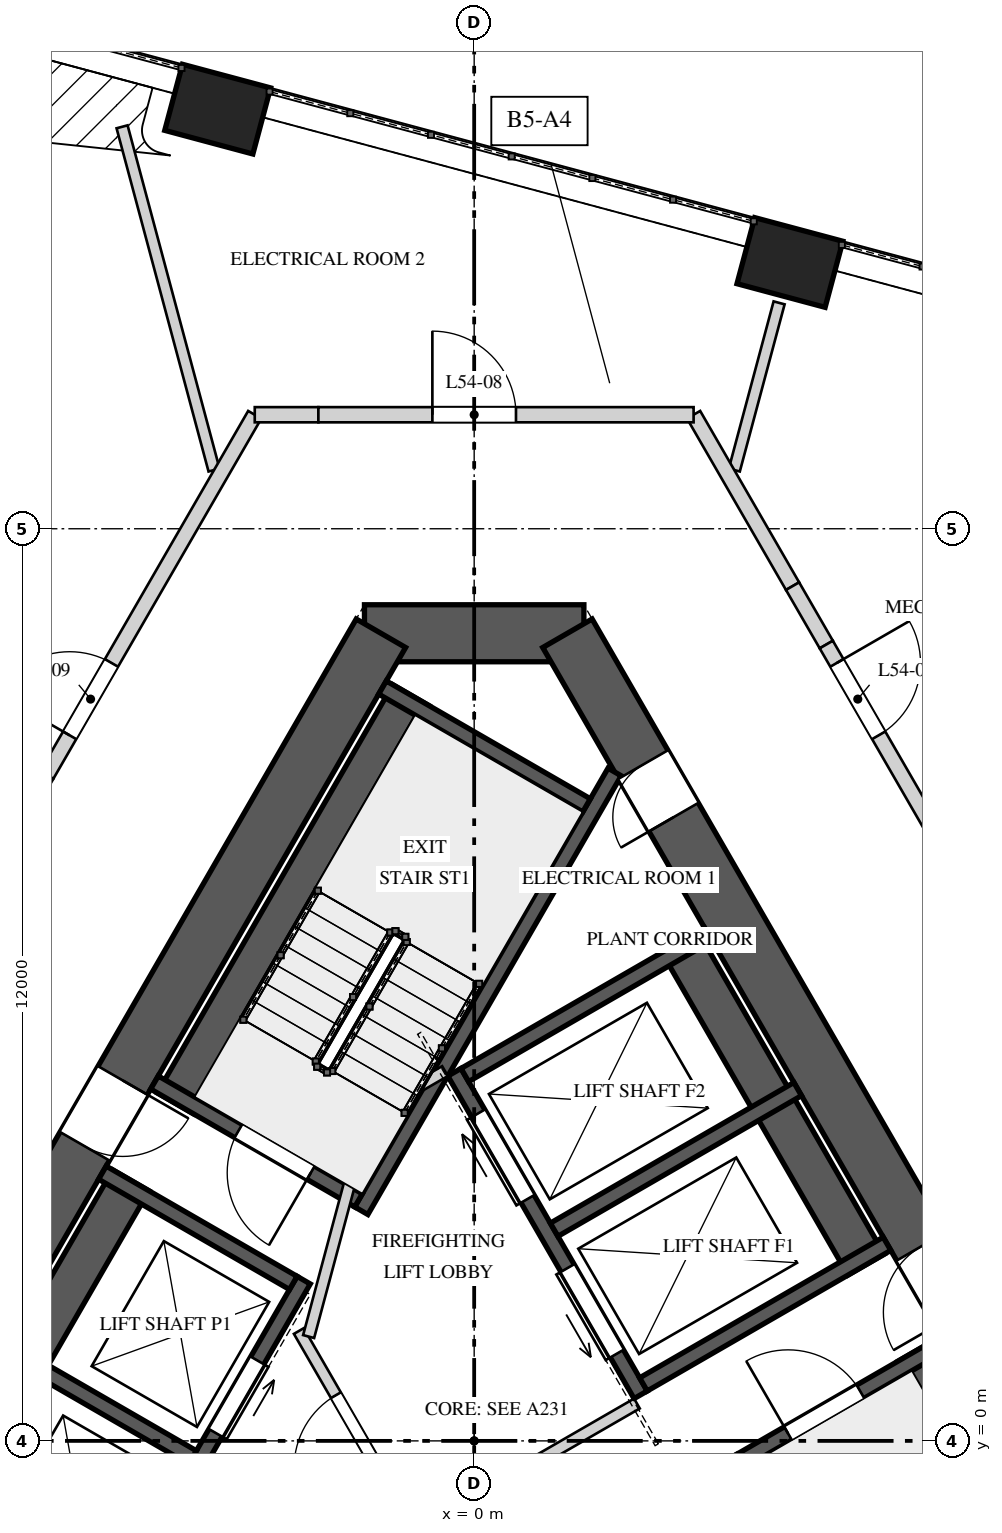
"""IFC4 building model, lengths in metres.
Left out: names, types, materials, properties, quantities, classifications, styles, units other than length and angle.
Written with IfcOpenShell. Run it as: python <this file> out.ifc"""

import sys

from ifc_helpers import new_model, si_unit, direction, frame, frame_2d, origin, origin_2d, place, context, subcontext, project, spatial, rectangle, extrude, element, fill, save


model = new_model("IFC4")
c1 = context("Model", 3, precision=1e-05, world=origin(), true_north=direction((0.0, 1.0)))
c2 = subcontext(c1, "Body", "Model", "MODEL_VIEW")
j1 = project(units=[si_unit("LENGTHUNIT", "METRE"), si_unit("PLANEANGLEUNIT", "RADIAN")], contexts=[c1])
p1 = place(None, origin())
s1 = spatial("IfcSite", under=j1, at=p1, CompositionType="ELEMENT")
p2 = place(p1, origin())
s2 = spatial("IfcBuilding", under=s1, at=p2, CompositionType="ELEMENT")
p3 = place(p2, frame((0.0, 0.0, 232.0)))
s3 = spatial("IfcBuildingStorey", under=s2, at=p3, CompositionType="ELEMENT", Elevation=232.0)
p4 = place(p3, frame((1.443, 10.625, 0.0), z_axis=(0.0, 0.0, 1.0), x_axis=(-1.0, 0.0, 0.0)))
e1 = element("IfcWall", 1, at=p4, inside=s3, PredefinedType="SHEAR", context=c2, shape_type="SweptSolid", body=[
    extrude(rectangle(XDim=2.887, YDim=0.75, at=frame_2d((1.443, 0.0))), origin(), (0.0, 0.0, 1.0), 5.2),
])
p5 = place(p3, frame((-1.227, 10.625, 0.0), z_axis=(0.0, 0.0, 1.0), x_axis=(-0.500002161919, -0.866024155596, 0.0)))
e2 = element("IfcWall", 2, at=p5, inside=s3, PredefinedType="SHEAR", context=c2, shape_type="SweptSolid", body=[
    extrude(rectangle(XDim=17.176, YDim=0.75, at=frame_2d((8.588, 0.0))), origin(), (0.0, 0.0, 1.0), 5.2),
])
p6 = place(p5, frame((6.793, 0.0, 0.0)))
e3 = element("IfcOpeningElement", 3, at=p6, cuts=e2, PredefinedType="OPENING", context=c2, shape_type="SweptSolid", body=[
    extrude(rectangle(XDim=1.0, YDim=2.4, at=frame_2d((0.5, 1.2))), frame((0.0, 0.385, 0.0), z_axis=(0.0, -1.0, 0.0), x_axis=(1.0, 0.0, 0.0)), (0.0, 0.0, 1.0), 0.77),
])
p7 = place(p3, frame((9.815, -4.25, 0.0), z_axis=(0.0, 0.0, 1.0), x_axis=(-0.500002161919, 0.866024155596, 0.0)))
e4 = element("IfcWall", 4, at=p7, inside=s3, PredefinedType="SHEAR", context=c2, shape_type="SweptSolid", body=[
    extrude(rectangle(XDim=17.176, YDim=0.75, at=frame_2d((8.588, 0.0))), origin(), (0.0, 0.0, 1.0), 5.2),
])
p8 = place(p7, frame((6.863, 0.0, 0.0)))
e5 = element("IfcOpeningElement", 5, at=p8, cuts=e4, PredefinedType="OPENING", context=c2, shape_type="SweptSolid", body=[
    extrude(rectangle(XDim=1.0, YDim=2.4, at=frame_2d((0.5, 1.2))), frame((0.0, 0.385, 0.0), z_axis=(0.0, -1.0, 0.0), x_axis=(1.0, 0.0, 0.0)), (0.0, 0.0, 1.0), 0.77),
])
p9 = place(p7, frame((14.382, 0.0, 0.0)))
e6 = element("IfcOpeningElement", 6, at=p9, cuts=e4, PredefinedType="OPENING", context=c2, shape_type="SweptSolid", body=[
    extrude(rectangle(XDim=0.8, YDim=2.1, at=frame_2d((0.4, 1.05))), frame((0.0, 0.385, 0.0), z_axis=(0.0, -1.0, 0.0), x_axis=(1.0, 0.0, 0.0)), (0.0, 0.0, 1.0), 0.77),
])
for number, where, z_axis, x_axis in (
    (7, (4.154, 15.503, 0.0), (0.0, 0.0, 1.0), (-0.966, 0.259, 0.0)),
    (8, (-3.375, 17.521, 0.0), (0.0, 0.0, 1.0), (-0.966, 0.259, 0.0)),
):
    element("IfcColumn", number, at=place(p3, frame(where, z_axis=z_axis, x_axis=x_axis)), inside=s3, PredefinedType="COLUMN", context=c2, shape_type="SweptSolid", body=[
        extrude(rectangle(XDim=1.2, YDim=0.9, at=origin_2d()), origin(), (0.0, 0.0, 1.0), 2.806),
    ])
p10 = place(p3, frame((-0.831, 9.81, 0.0), z_axis=(0.0, 0.0, 1.0), x_axis=(-0.500009909098, -0.866019682689, 0.0)))
e9 = element("IfcWall", 9, at=p10, inside=s3, PredefinedType="SOLIDWALL", context=c2, shape_type="SweptSolid", body=[
    extrude(rectangle(XDim=6.2, YDim=0.55, at=frame_2d((3.1, 0.0))), origin(), (0.0, 0.0, 1.0), 4.85),
])
p11 = place(p3, frame((1.847, 8.8, 0.0), z_axis=(0.0, 0.0, 1.0), x_axis=(-0.499980354584, -0.866036745774, 0.0)))
e10 = element("IfcWall", 10, at=p11, inside=s3, PredefinedType="SOLIDWALL", context=c2, shape_type="SweptSolid", body=[
    extrude(rectangle(XDim=6.665, YDim=0.2, at=frame_2d((3.333, 0.0))), origin(), (0.0, 0.0, 1.0), 4.85),
])
p12 = place(p3, frame((1.479, 8.361, 0.0), z_axis=(0.0, 0.0, 1.0), x_axis=(-0.86600983753, 0.500026960575, 0.0)))
e11 = element("IfcWall", 11, at=p12, inside=s3, PredefinedType="SOLIDWALL", context=c2, shape_type="SweptSolid", body=[
    extrude(rectangle(XDim=3.1, YDim=0.2, at=frame_2d((1.55, 0.0))), origin(), (0.0, 0.0, 1.0), 4.85),
])
p13 = place(p3, frame((-1.521, 3.165, 0.0), z_axis=(0.0, 0.0, 1.0), x_axis=(-0.86600983753, 0.500026960575, 0.0)))
e12 = element("IfcWall", 12, at=p13, inside=s3, PredefinedType="SOLIDWALL", context=c2, shape_type="SweptSolid", body=[
    extrude(rectangle(XDim=3.1, YDim=0.2, at=frame_2d((1.55, 0.0))), origin(), (0.0, 0.0, 1.0), 4.85),
])
p14 = place(p13, frame((0.725, 0.0, 0.0)))
e13 = element("IfcOpeningElement", 13, at=p14, cuts=e12, PredefinedType="OPENING", context=c2, shape_type="SweptSolid", body=[
    extrude(rectangle(XDim=1.1, YDim=2.4, at=frame_2d((0.55, 1.2))), frame((0.0, 0.11, 0.0), z_axis=(0.0, -1.0, 0.0), x_axis=(1.0, 0.0, 0.0)), (0.0, 0.0, 1.0), 0.22),
])
p15 = place(p3, frame((8.911, -4.185, 0.0), z_axis=(0.0, 0.0, 1.0), x_axis=(-0.500009909098, 0.866019682689, 0.0)))
e14 = element("IfcWall", 14, at=p15, inside=s3, PredefinedType="SOLIDWALL", context=c2, shape_type="SweptSolid", body=[
    extrude(rectangle(XDim=6.2, YDim=0.55, at=frame_2d((3.1, 0.0))), origin(), (0.0, 0.0, 1.0), 4.85),
])
p16 = place(p3, frame((3.501, -0.265, 0.0), z_axis=(0.0, 0.0, 1.0), x_axis=(0.866043940782, 0.499967891604, 0.0)))
e15 = element("IfcWall", 15, at=p16, inside=s3, PredefinedType="SOLIDWALL", context=c2, shape_type="SweptSolid", body=[
    extrude(rectangle(XDim=3.1, YDim=0.2, at=frame_2d((1.55, 0.0))), origin(), (0.0, 0.0, 1.0), 4.85),
])
p17 = place(p16, frame((0.725, 0.0, 0.0)))
e16 = element("IfcOpeningElement", 16, at=p17, cuts=e15, PredefinedType="OPENING", context=c2, shape_type="SweptSolid", body=[
    extrude(rectangle(XDim=1.1, YDim=2.4, at=frame_2d((0.55, 1.2))), frame((0.0, 0.11, 0.0), z_axis=(0.0, -1.0, 0.0), x_axis=(1.0, 0.0, 0.0)), (0.0, 0.0, 1.0), 0.22),
])
p18 = place(p3, frame((-2.243, 2.115, 0.0), z_axis=(0.0, 0.0, 1.0), x_axis=(-0.499996545922, -0.866027397988, 0.0)))
e17 = element("IfcWall", 17, at=p18, inside=s3, PredefinedType="SOLIDWALL", context=c2, shape_type="SweptSolid", body=[
    extrude(rectangle(XDim=5.5, YDim=0.2, at=frame_2d((2.75, 0.0))), origin(), (0.0, 0.0, 1.0), 4.85),
])
p19 = place(p18, frame((1.22, 0.0, 0.0)))
e18 = element("IfcOpeningElement", 18, at=p19, cuts=e17, PredefinedType="OPENING", context=c2, shape_type="SweptSolid", body=[
    extrude(rectangle(XDim=1.1, YDim=2.1, at=frame_2d((0.55, 1.05))), frame((0.0, 0.11, 0.0), z_axis=(0.0, -1.0, 0.0), x_axis=(1.0, 0.0, 0.0)), (0.0, 0.0, 1.0), 0.22),
])
p20 = place(p18, frame((3.525, 0.0, 0.0)))
e19 = element("IfcOpeningElement", 19, at=p20, cuts=e17, PredefinedType="OPENING", context=c2, shape_type="SweptSolid", body=[
    extrude(rectangle(XDim=1.1, YDim=2.1, at=frame_2d((0.55, 1.05))), frame((0.0, 0.11, 0.0), z_axis=(0.0, -1.0, 0.0), x_axis=(1.0, 0.0, 0.0)), (0.0, 0.0, 1.0), 0.22),
])
p21 = place(p3, frame((-4.516, 3.427, 0.0), z_axis=(0.0, 0.0, 1.0), x_axis=(-0.499996545922, -0.866027397988, 0.0)))
e20 = element("IfcWall", 20, at=p21, inside=s3, PredefinedType="SOLIDWALL", context=c2, shape_type="SweptSolid", body=[
    extrude(rectangle(XDim=5.5, YDim=0.55, at=frame_2d((2.75, 0.0))), origin(), (0.0, 0.0, 1.0), 4.85),
])
p22 = place(p3, frame((-2.38, 2.078, 0.0), z_axis=(0.0, 0.0, 1.0), x_axis=(-0.866032775405, 0.499987231761, 0.0)))
e21 = element("IfcWall", 21, at=p22, inside=s3, PredefinedType="SOLIDWALL", context=c2, shape_type="SweptSolid", body=[
    extrude(rectangle(XDim=2.9, YDim=0.2, at=frame_2d((1.45, 0.0))), origin(), (0.0, 0.0, 1.0), 4.85),
])
p23 = place(p3, frame((-3.705, -0.217, 0.0), z_axis=(0.0, 0.0, 1.0), x_axis=(-0.865996321171, 0.50005036918, 0.0)))
e22 = element("IfcWall", 22, at=p23, inside=s3, PredefinedType="SOLIDWALL", context=c2, shape_type="SweptSolid", body=[
    extrude(rectangle(XDim=2.9, YDim=0.2, at=frame_2d((1.45, 0.0))), origin(), (0.0, 0.0, 1.0), 4.85),
])
p24 = place(p3, frame((2.19, 0.606, 0.0), z_axis=(0.0, 0.0, 1.0), x_axis=(-0.500002801628, 0.866023786258, 0.0)))
e23 = element("IfcWall", 23, at=p24, inside=s3, PredefinedType="SOLIDWALL", context=c2, shape_type="SweptSolid", body=[
    extrude(rectangle(XDim=4.9, YDim=0.2, at=frame_2d((2.45, 0.0))), origin(), (0.0, 0.0, 1.0), 4.85),
])
p25 = place(p24, frame((0.625, 0.0, 0.0)))
e24 = element("IfcOpeningElement", 24, at=p25, cuts=e23, PredefinedType="OPENING", context=c2, shape_type="SweptSolid", body=[
    extrude(rectangle(XDim=1.3, YDim=2.1, at=frame_2d((0.65, 1.05))), frame((0.0, 0.11, 0.0), z_axis=(0.0, -1.0, 0.0), x_axis=(1.0, 0.0, 0.0)), (0.0, 0.0, 1.0), 0.22),
])
p26 = place(p24, frame((2.975, 0.0, 0.0)))
e25 = element("IfcOpeningElement", 25, at=p26, cuts=e23, PredefinedType="OPENING", context=c2, shape_type="SweptSolid", body=[
    extrude(rectangle(XDim=1.3, YDim=2.1, at=frame_2d((0.65, 1.05))), frame((0.0, 0.11, 0.0), z_axis=(0.0, -1.0, 0.0), x_axis=(1.0, 0.0, 0.0)), (0.0, 0.0, 1.0), 0.22),
])
p27 = place(p3, frame((5.156, 2.319, 0.0), z_axis=(0.0, 0.0, 1.0), x_axis=(-0.500018594424, 0.866014668023, 0.0)))
e26 = element("IfcWall", 26, at=p27, inside=s3, PredefinedType="SOLIDWALL", context=c2, shape_type="SweptSolid", body=[
    extrude(rectangle(XDim=4.9, YDim=0.55, at=frame_2d((2.45, 0.0))), origin(), (0.0, 0.0, 1.0), 4.85),
])
for number, where, z_axis, x_axis in (
    (27, (2.227, 0.743, 0.0), (0.0, 0.0, 1.0), (0.866, 0.5, 0.0)),
    (28, (1.052, 2.778, 0.0), (0.0, 0.0, 1.0), (0.866, 0.5, 0.0)),
):
    element("IfcWall", number, at=place(p3, frame(where, z_axis=z_axis, x_axis=x_axis)), inside=s3, PredefinedType="SOLIDWALL", context=c2, shape_type="SweptSolid", body=[
        extrude(rectangle(XDim=3.7, YDim=0.2, at=frame_2d((1.85, 0.0))), origin(), (0.0, 0.0, 1.0), 4.85),
    ])
p28 = place(p3, frame((-0.123, 4.813, 0.0), z_axis=(0.0, 0.0, 1.0), x_axis=(0.866000971088, 0.500042316284, 0.0)))
e29 = element("IfcWall", 29, at=p28, inside=s3, PredefinedType="SOLIDWALL", context=c2, shape_type="SweptSolid", body=[
    extrude(rectangle(XDim=3.7, YDim=0.2, at=frame_2d((1.85, 0.0))), origin(), (0.0, 0.0, 1.0), 4.85),
])
p29 = place(p3, frame((-0.744, -1.261, 0.0), z_axis=(0.0, 0.0, 1.0), x_axis=(-0.500004234368, 0.866022959057, 0.0)))
e30 = element("IfcWall", 30, at=p29, inside=s3, PredefinedType="PARTITIONING", context=c2, shape_type="SweptSolid", body=[
    extrude(rectangle(XDim=3.125, YDim=0.15, at=frame_2d((1.562, 0.0))), origin(), (0.0, 0.0, 1.0), 4.85),
])
p30 = place(p29, frame((1.05, 0.0, 0.0)))
e31 = element("IfcOpeningElement", 31, at=p30, cuts=e30, PredefinedType="OPENING", context=c2, shape_type="SweptSolid", body=[
    extrude(rectangle(XDim=1.1, YDim=2.4, at=frame_2d((0.55, 1.2))), frame((0.0, 0.085, 0.0), z_axis=(0.0, -1.0, 0.0), x_axis=(1.0, 0.0, 0.0)), (0.0, 0.0, 1.0), 0.17),
])
p31 = place(p3, frame((-0.717, -1.159, 0.0), z_axis=(0.0, 0.0, 1.0), x_axis=(0.866008176907, 0.50002983664, 0.0)))
e32 = element("IfcWall", 32, at=p31, inside=s3, PredefinedType="PARTITIONING", context=c2, shape_type="SweptSolid", body=[
    extrude(rectangle(XDim=3.3, YDim=0.15, at=frame_2d((1.65, 0.0))), origin(), (0.0, 0.0, 1.0), 4.85),
])
p32 = place(p3, frame((-2.178, 1.372, 0.0), z_axis=(0.0, 0.0, 1.0), x_axis=(0.258808958833, 0.96592852884, 0.0)))
e33 = element("IfcWall", 33, at=p32, inside=s3, PredefinedType="PARTITIONING", context=c2, shape_type="SweptSolid", body=[
    extrude(rectangle(XDim=2.903, YDim=0.15, at=frame_2d((1.451, 0.0))), origin(), (0.0, 0.0, 1.0), 4.85),
])
p33 = place(p3, frame((-1.51, 4.215, 0.0), z_axis=(0.0, 0.0, 1.0), x_axis=(0.866085525409, 0.49989585183, 0.0)))
e34 = element("IfcWall", 34, at=p33, inside=s3, PredefinedType="PARTITIONING", context=c2, shape_type="SweptSolid", body=[
    extrude(rectangle(XDim=1.3, YDim=0.15, at=frame_2d((0.65, 0.0))), origin(), (0.0, 0.0, 1.0), 4.85),
])
p34 = place(p3, frame((-3.422, 12.772, 0.0), z_axis=(0.0, 0.0, 1.0), x_axis=(-0.258806561715, 0.965929171116, 0.0)))
e35 = element("IfcWall", 35, at=p34, inside=s3, PredefinedType="PARTITIONING", context=c2, shape_type="SweptSolid", body=[
    extrude(rectangle(XDim=4.675, YDim=0.15, at=frame_2d((2.337, 0.0))), origin(), (0.0, 0.0, 1.0), 4.85),
])
p35 = place(p3, frame((3.422, 12.772, 0.0), z_axis=(0.0, 0.0, 1.0), x_axis=(0.258796817064, 0.965931782, 0.0)))
e36 = element("IfcWall", 36, at=p35, inside=s3, PredefinedType="PARTITIONING", context=c2, shape_type="SweptSolid", body=[
    extrude(rectangle(XDim=2.277, YDim=0.15, at=frame_2d((1.139, 0.0))), origin(), (0.0, 0.0, 1.0), 4.85),
])
p36 = place(p3, frame((2.887, 13.5, 0.0), z_axis=(0.0, 0.0, 1.0), x_axis=(0.500001094379, -0.866024771944, 0.0)))
e37 = element("IfcWall", 37, at=p36, inside=s3, PredefinedType="SOLIDWALL", context=c2, shape_type="SweptSolid", body=[
    extrude(rectangle(XDim=2.604, YDim=0.2, at=frame_2d((1.302, 0.0))), origin(), (0.0, 0.0, 1.0), 4.85),
])
p37 = place(p3, frame((4.189, 11.245, 0.0), z_axis=(0.0, 0.0, 1.0), x_axis=(0.500016243463, -0.866016025414, 0.0)))
e38 = element("IfcWall", 38, at=p37, inside=s3, PredefinedType="SOLIDWALL", context=c2, shape_type="SweptSolid", body=[
    extrude(rectangle(XDim=0.887, YDim=0.2, at=frame_2d((0.444, 0.0))), origin(), (0.0, 0.0, 1.0), 4.15),
])
p38 = place(p3, frame((4.632, 10.477, 0.0), z_axis=(0.0, 0.0, 1.0), x_axis=(0.499984573973, -0.866034309822, 0.0)))
e39 = element("IfcWall", 39, at=p38, inside=s3, PredefinedType="SOLIDWALL", context=c2, shape_type="SweptSolid", body=[
    extrude(rectangle(XDim=4.193, YDim=0.2, at=frame_2d((2.096, 0.0))), origin(), (0.0, 0.0, 1.0), 4.85),
])
p39 = place(p38, frame((0.279, 0.0, 0.0)))
e40 = element("IfcOpeningElement", 40, at=p39, cuts=e39, PredefinedType="OPENING", context=c2, shape_type="SweptSolid", body=[
    extrude(rectangle(XDim=1.1, YDim=2.2, at=frame_2d((0.55, 1.1))), frame((0.0, 0.11, 0.0), z_axis=(0.0, -1.0, 0.0), x_axis=(1.0, 0.0, 0.0)), (0.0, 0.0, 1.0), 0.22),
])
p40 = place(p3, frame((-6.064, 7.996, 0.0), z_axis=(0.0, 0.0, 1.0), x_axis=(0.499913830031, 0.866075148324, 0.0)))
e41 = element("IfcWall", 41, at=p40, inside=s3, PredefinedType="SOLIDWALL", context=c2, shape_type="SweptSolid", body=[
    extrude(rectangle(XDim=0.884, YDim=0.2, at=frame_2d((0.442, 0.0))), origin(), (0.0, 0.0, 1.0), 3.95),
])
p41 = place(p3, frame((-5.623, 8.761, 0.0), z_axis=(0.0, 0.0, 1.0), x_axis=(0.500021123982, 0.866013207504, 0.0)))
e42 = element("IfcWall", 42, at=p41, inside=s3, PredefinedType="SOLIDWALL", context=c2, shape_type="SweptSolid", body=[
    extrude(rectangle(XDim=5.472, YDim=0.2, at=frame_2d((2.736, 0.0))), origin(), (0.0, 0.0, 1.0), 4.85),
])
p42 = place(p41, frame((0.602, 0.0, 0.0)))
e43 = element("IfcOpeningElement", 43, at=p42, cuts=e42, PredefinedType="OPENING", context=c2, shape_type="SweptSolid", body=[
    extrude(rectangle(XDim=1.1, YDim=2.2, at=frame_2d((0.55, 1.1))), frame((0.0, 0.11, 0.0), z_axis=(0.0, -1.0, 0.0), x_axis=(1.0, 0.0, 0.0)), (0.0, 0.0, 1.0), 0.22),
])
p43 = place(p3, frame((-2.887, 13.5, 0.0), z_axis=(0.0, 0.0, 1.0), x_axis=(1.0, 0.0, 0.0)))
e44 = element("IfcWall", 44, at=p43, inside=s3, PredefinedType="SOLIDWALL", context=c2, shape_type="SweptSolid", body=[
    extrude(rectangle(XDim=0.837, YDim=0.2, at=frame_2d((0.418, 0.0))), origin(), (0.0, 0.0, 1.0), 4.15),
])
p44 = place(p3, frame((-2.05, 13.5, 0.0), z_axis=(0.0, 0.0, 1.0), x_axis=(1.0, 0.0, 0.0)))
e45 = element("IfcWall", 45, at=p44, inside=s3, PredefinedType="SOLIDWALL", context=c2, shape_type="SweptSolid", body=[
    extrude(rectangle(XDim=4.937, YDim=0.2, at=frame_2d((2.468, 0.0))), origin(), (0.0, 0.0, 1.0), 4.85),
])
p45 = place(p44, frame((1.5, 0.0, 0.0)))
e46 = element("IfcOpeningElement", 46, at=p45, cuts=e45, PredefinedType="OPENING", context=c2, shape_type="SweptSolid", body=[
    extrude(rectangle(XDim=1.1, YDim=2.2, at=frame_2d((0.55, 1.1))), frame((0.0, 0.11, 0.0), z_axis=(0.0, -1.0, 0.0), x_axis=(1.0, 0.0, 0.0)), (0.0, 0.0, 1.0), 0.22),
])
p46 = place(p14, origin())
e47 = element("IfcDoor", 47, at=p46, inside=s3, OperationType="SINGLE_SWING_RIGHT", PredefinedType="DOOR", context=c2, shape_type="SweptSolid", body=[
    extrude(rectangle(XDim=1.1, YDim=2.4, at=frame_2d((0.55, 1.2))), frame((0.0, 0.025, 0.0), z_axis=(0.0, -1.0, 0.0), x_axis=(1.0, 0.0, 0.0)), (0.0, 0.0, 1.0), 0.05),
])
fill(e13, e47)
p47 = place(p17, origin())
e48 = element("IfcDoor", 48, at=p47, inside=s3, OperationType="SINGLE_SWING_RIGHT", PredefinedType="DOOR", context=c2, shape_type="SweptSolid", body=[
    extrude(rectangle(XDim=1.1, YDim=2.4, at=frame_2d((0.55, 1.2))), frame((0.0, 0.025, 0.0), z_axis=(0.0, -1.0, 0.0), x_axis=(1.0, 0.0, 0.0)), (0.0, 0.0, 1.0), 0.05),
])
fill(e16, e48)
p48 = place(p19, origin())
e49 = element("IfcDoor", 49, at=p48, inside=s3, OperationType="SLIDING_TO_LEFT", PredefinedType="DOOR", context=c2, shape_type="SweptSolid", body=[
    extrude(rectangle(XDim=1.1, YDim=2.1, at=frame_2d((0.55, 1.05))), frame((0.0, 0.025, 0.0), z_axis=(0.0, -1.0, 0.0), x_axis=(1.0, 0.0, 0.0)), (0.0, 0.0, 1.0), 0.05),
])
fill(e18, e49)
p49 = place(p25, origin())
e50 = element("IfcDoor", 50, at=p49, inside=s3, OperationType="SLIDING_TO_LEFT", PredefinedType="DOOR", context=c2, shape_type="SweptSolid", body=[
    extrude(rectangle(XDim=1.3, YDim=2.1, at=frame_2d((0.65, 1.05))), frame((0.0, 0.025, 0.0), z_axis=(0.0, -1.0, 0.0), x_axis=(1.0, 0.0, 0.0)), (0.0, 0.0, 1.0), 0.05),
])
fill(e24, e50)
p50 = place(p26, origin())
e51 = element("IfcDoor", 51, at=p50, inside=s3, OperationType="SLIDING_TO_RIGHT", PredefinedType="DOOR", context=c2, shape_type="SweptSolid", body=[
    extrude(rectangle(XDim=1.3, YDim=2.1, at=frame_2d((0.65, 1.05))), frame((0.0, 0.025, 0.0), z_axis=(0.0, -1.0, 0.0), x_axis=(1.0, 0.0, 0.0)), (0.0, 0.0, 1.0), 0.05),
])
fill(e25, e51)
p51 = place(p30, origin())
e52 = element("IfcDoor", 52, at=p51, inside=s3, OperationType="SINGLE_SWING_LEFT", PredefinedType="DOOR", context=c2, shape_type="SweptSolid", body=[
    extrude(rectangle(XDim=1.1, YDim=2.4, at=frame_2d((0.55, 1.2))), frame((0.0, 0.025, 0.0), z_axis=(0.0, -1.0, 0.0), x_axis=(1.0, 0.0, 0.0)), (0.0, 0.0, 1.0), 0.05),
])
fill(e31, e52)
p52 = place(p6, origin())
e53 = element("IfcDoor", 53, at=p52, inside=s3, OperationType="SINGLE_SWING_RIGHT", PredefinedType="DOOR", context=c2, shape_type="SweptSolid", body=[
    extrude(rectangle(XDim=1.0, YDim=2.4, at=frame_2d((0.5, 1.2))), frame((0.0, 0.025, 0.0), z_axis=(0.0, -1.0, 0.0), x_axis=(1.0, 0.0, 0.0)), (0.0, 0.0, 1.0), 0.05),
])
fill(e3, e53)
p53 = place(p8, origin())
e54 = element("IfcDoor", 54, at=p53, inside=s3, OperationType="SINGLE_SWING_RIGHT", PredefinedType="DOOR", context=c2, shape_type="SweptSolid", body=[
    extrude(rectangle(XDim=1.0, YDim=2.4, at=frame_2d((0.5, 1.2))), frame((0.0, 0.025, 0.0), z_axis=(0.0, -1.0, 0.0), x_axis=(1.0, 0.0, 0.0)), (0.0, 0.0, 1.0), 0.05),
])
fill(e5, e54)
p54 = place(p9, origin())
e55 = element("IfcDoor", 55, at=p54, inside=s3, OperationType="SINGLE_SWING_RIGHT", PredefinedType="DOOR", context=c2, shape_type="SweptSolid", body=[
    extrude(rectangle(XDim=0.8, YDim=2.1, at=frame_2d((0.4, 1.05))), frame((0.0, 0.025, 0.0), z_axis=(0.0, -1.0, 0.0), x_axis=(1.0, 0.0, 0.0)), (0.0, 0.0, 1.0), 0.05),
])
fill(e6, e55)
p55 = place(p39, origin())
e56 = element("IfcDoor", 56, at=p55, inside=s3, OperationType="SINGLE_SWING_LEFT", PredefinedType="DOOR", context=c2, shape_type="SweptSolid", body=[
    extrude(rectangle(XDim=1.1, YDim=2.2, at=frame_2d((0.55, 1.1))), frame((0.0, 0.025, 0.0), z_axis=(0.0, -1.0, 0.0), x_axis=(1.0, 0.0, 0.0)), (0.0, 0.0, 1.0), 0.05),
])
fill(e40, e56)
p56 = place(p45, origin())
e57 = element("IfcDoor", 57, at=p56, inside=s3, OperationType="SINGLE_SWING_RIGHT", PredefinedType="DOOR", context=c2, shape_type="SweptSolid", body=[
    extrude(rectangle(XDim=1.1, YDim=2.2, at=frame_2d((0.55, 1.1))), frame((0.0, 0.025, 0.0), z_axis=(0.0, -1.0, 0.0), x_axis=(1.0, 0.0, 0.0)), (0.0, 0.0, 1.0), 0.05),
])
fill(e46, e57)
p57 = place(p42, origin())
e58 = element("IfcDoor", 58, at=p57, inside=s3, OperationType="SINGLE_SWING_LEFT", PredefinedType="DOOR", context=c2, shape_type="SweptSolid", body=[
    extrude(rectangle(XDim=1.1, YDim=2.2, at=frame_2d((0.55, 1.1))), frame((0.0, 0.025, 0.0), z_axis=(0.0, -1.0, 0.0), x_axis=(1.0, 0.0, 0.0)), (0.0, 0.0, 1.0), 0.05),
])
fill(e43, e58)
save(model, sys.argv[1])
